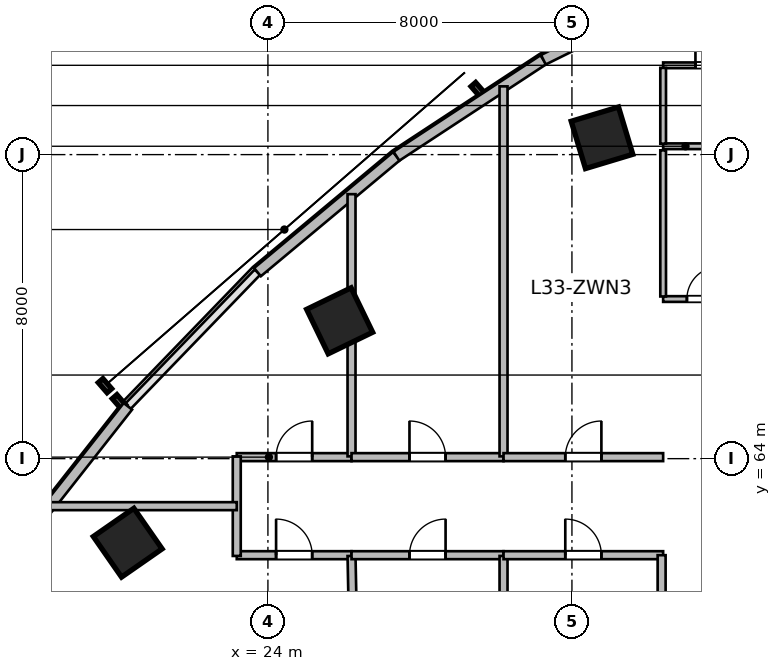
"""IFC4 building model, lengths in metres.
Left out: names, types, materials, properties, quantities, classifications, styles, units other than length and angle.
Written with IfcOpenShell. Run it as: python <this file> out.ifc"""

import sys

from ifc_helpers import new_model, si_unit, direction, frame, frame_2d, origin, origin_2d, place, context, subcontext, project, spatial, rectangle, extrude, source, transform, mapped, element, fill, save


model = new_model("IFC4")
c1 = context("Model", 3, precision=1e-05, world=origin(), true_north=direction((0.0, 1.0)))
c2 = subcontext(c1, "Body", "Model", "MODEL_VIEW")
j1 = project(units=[si_unit("LENGTHUNIT", "METRE"), si_unit("PLANEANGLEUNIT", "RADIAN")], contexts=[c1])
p1 = place(None, origin())
s1 = spatial("IfcSite", under=j1, at=p1, CompositionType="ELEMENT")
p2 = place(p1, origin())
s2 = spatial("IfcBuilding", under=s1, at=p2, CompositionType="ELEMENT")
p3 = place(p2, frame((0.0, 0.0, 138.9)))
s3 = spatial("IfcBuildingStorey", under=s2, at=p3, CompositionType="ELEMENT", Elevation=138.9)
m1 = source(origin(), c2, "Body", "SweptSolid", [
    extrude(rectangle(XDim=1.3, YDim=1.3, at=origin_2d()), origin(), (0.0, 0.0, 1.0), 3.9),
])
for number, where, z_axis, x_axis in (
    (1, (20.311, 61.789, 0.0), (0.0, 0.0, 1.0), (-0.571, 0.821, 0.0)),
    (2, (25.888, 67.627, 0.0), (0.0, 0.0, 1.0), (-0.436, 0.9, 0.0)),
    (3, (32.791, 72.442, 0.0), (0.0, 0.0, 1.0), (-0.289, 0.957, 0.0)),
):
    element("IfcColumn", number, at=place(p3, frame(where, z_axis=z_axis, x_axis=x_axis)), inside=s3, PredefinedType="COLUMN", context=c2, shape_type="MappedRepresentation", body=[
        mapped(m1, transform((0.0, 0.0, 0.0), scale=1.0)),
    ])
m2 = source(origin(), c2, "Body", "SweptSolid", [
    extrude(rectangle(XDim=5.058, YDim=0.28, at=frame_2d((2.529, 0.0))), origin(), (0.0, 0.0, 1.0), 3.65),
])
p4 = place(p3, frame((17.188, 61.4, 0.0), z_axis=(0.0, 0.0, 1.0), x_axis=(0.618145507434, 0.786063694391, 0.0)))
e4 = element("IfcWall", 4, at=p4, inside=s3, PredefinedType="SOLIDWALL", context=c2, shape_type="MappedRepresentation", body=[
    mapped(m2, transform((0.0, 0.0, 0.0), scale=1.0)),
])
m3 = source(origin(), c2, "Body", "SweptSolid", [
    extrude(rectangle(XDim=4.762, YDim=0.28, at=frame_2d((2.381, 0.0))), origin(), (0.0, 0.0, 1.0), 3.65),
])
p5 = place(p3, frame((23.725, 68.907, 0.0), z_axis=(0.0, 0.0, 1.0), x_axis=(0.767952279762, 0.640507061638, 0.0)))
e5 = element("IfcWall", 5, at=p5, inside=s3, PredefinedType="SOLIDWALL", context=c2, shape_type="MappedRepresentation", body=[
    mapped(m3, transform((0.0, 0.0, 0.0), scale=1.0)),
])
m4 = source(origin(), c2, "Body", "SweptSolid", [
    extrude(rectangle(XDim=4.626, YDim=0.28, at=frame_2d((2.313, 0.0))), origin(), (0.0, 0.0, 1.0), 3.65),
])
p6 = place(p3, frame((27.382, 71.958, 0.0), z_axis=(0.0, 0.0, 1.0), x_axis=(0.83595938331, 0.548791316855, 0.0)))
e6 = element("IfcWall", 6, at=p6, inside=s3, PredefinedType="SOLIDWALL", context=c2, shape_type="MappedRepresentation", body=[
    mapped(m4, transform((0.0, 0.0, 0.0), scale=1.0)),
])
m5 = source(origin(), c2, "Body", "SweptSolid", [
    extrude(rectangle(XDim=4.506, YDim=0.28, at=frame_2d((2.253, 0.0))), origin(), (0.0, 0.0, 1.0), 3.65),
])
p7 = place(p3, frame((31.249, 74.496, 0.0), z_axis=(0.0, 0.0, 1.0), x_axis=(0.89597155075, 0.444111450254, 0.0)))
e7 = element("IfcWall", 7, at=p7, inside=s3, PredefinedType="SOLIDWALL", context=c2, shape_type="MappedRepresentation", body=[
    mapped(m5, transform((0.0, 0.0, 0.0), scale=1.0)),
])
m6 = source(origin(), c2, "Body", "SweptSolid", [
    extrude(rectangle(XDim=2.1, YDim=0.15, at=frame_2d((1.05, 0.0))), origin(), (0.0, 0.0, 1.0), 3.65),
])
p8 = place(p3, frame((34.4, 72.22, 0.0), z_axis=(0.0, 0.0, 1.0), x_axis=(1.0, 0.0, 0.0)))
e8 = element("IfcWall", 8, at=p8, inside=s3, PredefinedType="PARTITIONING", context=c2, shape_type="MappedRepresentation", body=[
    mapped(m6, transform((0.0, 0.0, 0.0), scale=1.0)),
])
m7 = source(origin(), c2, "Body", "SweptSolid", [
    extrude(rectangle(XDim=2.8, YDim=0.15, at=frame_2d((1.4, 0.0))), origin(), (0.0, 0.0, 1.0), 3.65),
])
p9 = place(p3, frame((34.4, 74.35, 0.0), z_axis=(0.0, 0.0, 1.0), x_axis=(1.0, 0.0, 0.0)))
e9 = element("IfcWall", 9, at=p9, inside=s3, PredefinedType="PARTITIONING", context=c2, shape_type="MappedRepresentation", body=[
    mapped(m7, transform((0.0, 0.0, 0.0), scale=1.0)),
])
p10 = place(p9, frame((0.85, 0.0, 0.0)))
e10 = element("IfcOpeningElement", 10, at=p10, cuts=e9, PredefinedType="OPENING", context=c2, shape_type="SweptSolid", body=[
    extrude(rectangle(XDim=1.1, YDim=2.15, at=frame_2d((0.55, 1.075))), frame((0.0, 0.085, 0.0), z_axis=(0.0, -1.0, 0.0), x_axis=(1.0, 0.0, 0.0)), (0.0, 0.0, 1.0), 0.17),
])
m8 = source(origin(), c2, "Body", "SweptSolid", [
    extrude(rectangle(XDim=1.995, YDim=0.15, at=frame_2d((0.998, 0.0))), origin(), (0.0, 0.0, 1.0), 3.65),
])
p11 = place(p3, frame((34.4, 72.288, 0.0), z_axis=(0.0, 0.0, 1.0), x_axis=(0.0, 1.0, 0.0)))
e11 = element("IfcWall", 11, at=p11, inside=s3, PredefinedType="PARTITIONING", context=c2, shape_type="MappedRepresentation", body=[
    mapped(m8, transform((0.0, 0.0, 0.0), scale=1.0)),
])
p12 = place(p3, frame((34.4, 68.2, 0.0), z_axis=(0.0, 0.0, 1.0), x_axis=(1.0, 0.0, 0.0)))
e12 = element("IfcWall", 12, at=p12, inside=s3, PredefinedType="PARTITIONING", context=c2, shape_type="MappedRepresentation", body=[
    mapped(m6, transform((0.0, 0.0, 0.0), scale=1.0)),
])
p13 = place(p12, frame((0.625, 0.0, 0.0)))
e13 = element("IfcOpeningElement", 13, at=p13, cuts=e12, PredefinedType="OPENING", context=c2, shape_type="SweptSolid", body=[
    extrude(rectangle(XDim=0.85, YDim=2.1, at=frame_2d((0.425, 1.05))), frame((0.0, 0.085, 0.0), z_axis=(0.0, -1.0, 0.0), x_axis=(1.0, 0.0, 0.0)), (0.0, 0.0, 1.0), 0.17),
])
m9 = source(origin(), c2, "Body", "SweptSolid", [
    extrude(rectangle(XDim=3.845, YDim=0.15, at=frame_2d((1.922, 0.0))), origin(), (0.0, 0.0, 1.0), 3.65),
])
p14 = place(p3, frame((34.4, 68.268, 0.0), z_axis=(0.0, 0.0, 1.0), x_axis=(0.0, 1.0, 0.0)))
e14 = element("IfcWall", 14, at=p14, inside=s3, PredefinedType="PARTITIONING", context=c2, shape_type="MappedRepresentation", body=[
    mapped(m9, transform((0.0, 0.0, 0.0), scale=1.0)),
])
m10 = source(origin(), c2, "Body", "SweptSolid", [
    extrude(rectangle(XDim=3.02, YDim=0.21, at=frame_2d((1.51, 0.0))), origin(), (0.0, 0.0, 1.0), 3.65),
])
p15 = place(p3, frame((23.18, 64.04, 0.0), z_axis=(0.0, 0.0, 1.0), x_axis=(1.0, 0.0, 0.0)))
e15 = element("IfcWall", 15, at=p15, inside=s3, PredefinedType="PARTITIONING", context=c2, shape_type="MappedRepresentation", body=[
    mapped(m10, transform((0.0, 0.0, 0.0), scale=1.0)),
])
p16 = place(p15, frame((1.035, 0.0, 0.0)))
e16 = element("IfcOpeningElement", 16, at=p16, cuts=e15, PredefinedType="OPENING", context=c2, shape_type="SweptSolid", body=[
    extrude(rectangle(XDim=0.95, YDim=2.1, at=frame_2d((0.475, 1.05))), frame((0.0, 0.115, 0.0), z_axis=(0.0, -1.0, 0.0), x_axis=(1.0, 0.0, 0.0)), (0.0, 0.0, 1.0), 0.23),
])
m11 = source(origin(), c2, "Body", "SweptSolid", [
    extrude(rectangle(XDim=6.899, YDim=0.21, at=frame_2d((3.449, 0.0))), origin(), (0.0, 0.0, 1.0), 2.942),
])
p17 = place(p3, frame((26.2, 64.06, 0.0), z_axis=(0.0, 0.0, 1.0), x_axis=(0.0, 1.0, 0.0)))
e17 = element("IfcWall", 17, at=p17, inside=s3, PredefinedType="PARTITIONING", context=c2, shape_type="MappedRepresentation", body=[
    mapped(m11, transform((0.0, 0.0, 0.0), scale=1.0)),
])
m12 = source(origin(), c2, "Body", "SweptSolid", [
    extrude(rectangle(XDim=4.0, YDim=0.21, at=frame_2d((2.0, 0.0))), origin(), (0.0, 0.0, 1.0), 3.65),
])
p18 = place(p3, frame((26.2, 64.04, 0.0), z_axis=(0.0, 0.0, 1.0), x_axis=(1.0, 0.0, 0.0)))
e18 = element("IfcWall", 18, at=p18, inside=s3, PredefinedType="PARTITIONING", context=c2, shape_type="MappedRepresentation", body=[
    mapped(m12, transform((0.0, 0.0, 0.0), scale=1.0)),
])
p19 = place(p18, frame((1.525, 0.0, 0.0)))
e19 = element("IfcOpeningElement", 19, at=p19, cuts=e18, PredefinedType="OPENING", context=c2, shape_type="SweptSolid", body=[
    extrude(rectangle(XDim=0.95, YDim=2.1, at=frame_2d((0.475, 1.05))), frame((0.0, 0.115, 0.0), z_axis=(0.0, -1.0, 0.0), x_axis=(1.0, 0.0, 0.0)), (0.0, 0.0, 1.0), 0.23),
])
m13 = source(origin(), c2, "Body", "SweptSolid", [
    extrude(rectangle(XDim=9.736, YDim=0.21, at=frame_2d((4.868, 0.0))), origin(), (0.0, 0.0, 1.0), 3.65),
])
p20 = place(p3, frame((30.2, 64.06, 0.0), z_axis=(0.0, 0.0, 1.0), x_axis=(0.0, 1.0, 0.0)))
e20 = element("IfcWall", 20, at=p20, inside=s3, PredefinedType="PARTITIONING", context=c2, shape_type="MappedRepresentation", body=[
    mapped(m13, transform((0.0, 0.0, 0.0), scale=1.0)),
])
m14 = source(origin(), c2, "Body", "SweptSolid", [
    extrude(rectangle(XDim=4.2, YDim=0.21, at=frame_2d((2.1, 0.0))), origin(), (0.0, 0.0, 1.0), 3.65),
])
p21 = place(p3, frame((30.2, 64.04, 0.0), z_axis=(0.0, 0.0, 1.0), x_axis=(1.0, 0.0, 0.0)))
e21 = element("IfcWall", 21, at=p21, inside=s3, PredefinedType="PARTITIONING", context=c2, shape_type="MappedRepresentation", body=[
    mapped(m14, transform((0.0, 0.0, 0.0), scale=1.0)),
])
p22 = place(p21, frame((1.625, 0.0, 0.0)))
e22 = element("IfcOpeningElement", 22, at=p22, cuts=e21, PredefinedType="OPENING", context=c2, shape_type="SweptSolid", body=[
    extrude(rectangle(XDim=0.95, YDim=2.1, at=frame_2d((0.475, 1.05))), frame((0.0, 0.115, 0.0), z_axis=(0.0, -1.0, 0.0), x_axis=(1.0, 0.0, 0.0)), (0.0, 0.0, 1.0), 0.23),
])
p23 = place(p3, frame((23.18, 61.46, 0.0), z_axis=(0.0, 0.0, 1.0), x_axis=(1.0, 0.0, 0.0)))
e23 = element("IfcWall", 23, at=p23, inside=s3, PredefinedType="PARTITIONING", context=c2, shape_type="MappedRepresentation", body=[
    mapped(m10, transform((0.0, 0.0, 0.0), scale=1.0)),
])
p24 = place(p23, frame((1.035, 0.0, 0.0)))
e24 = element("IfcOpeningElement", 24, at=p24, cuts=e23, PredefinedType="OPENING", context=c2, shape_type="SweptSolid", body=[
    extrude(rectangle(XDim=0.95, YDim=2.1, at=frame_2d((0.475, 1.05))), frame((0.0, 0.115, 0.0), z_axis=(0.0, -1.0, 0.0), x_axis=(1.0, 0.0, 0.0)), (0.0, 0.0, 1.0), 0.23),
])
m15 = source(origin(), c2, "Body", "SweptSolid", [
    extrude(rectangle(XDim=24.204, YDim=0.21, at=frame_2d((12.102, 0.0))), origin(), (0.0, 0.0, 1.0), 2.942),
])
p25 = place(p3, frame((26.698, 37.241, 0.0), z_axis=(0.0, 0.0, 1.0), x_axis=(-0.020566881318, 0.999788479326, 0.0)))
e25 = element("IfcWall", 25, at=p25, inside=s3, PredefinedType="PARTITIONING", context=c2, shape_type="MappedRepresentation", body=[
    mapped(m15, transform((0.0, 0.0, 0.0), scale=1.0)),
])
p26 = place(p3, frame((26.2, 61.46, 0.0), z_axis=(0.0, 0.0, 1.0), x_axis=(1.0, 0.0, 0.0)))
e26 = element("IfcWall", 26, at=p26, inside=s3, PredefinedType="PARTITIONING", context=c2, shape_type="MappedRepresentation", body=[
    mapped(m12, transform((0.0, 0.0, 0.0), scale=1.0)),
])
p27 = place(p26, frame((1.525, 0.0, 0.0)))
e27 = element("IfcOpeningElement", 27, at=p27, cuts=e26, PredefinedType="OPENING", context=c2, shape_type="SweptSolid", body=[
    extrude(rectangle(XDim=0.95, YDim=2.1, at=frame_2d((0.475, 1.05))), frame((0.0, 0.115, 0.0), z_axis=(0.0, -1.0, 0.0), x_axis=(1.0, 0.0, 0.0)), (0.0, 0.0, 1.0), 0.23),
])
m16 = source(origin(), c2, "Body", "SweptSolid", [
    extrude(rectangle(XDim=19.103, YDim=0.21, at=frame_2d((9.552, 0.0))), origin(), (0.0, 0.0, 1.0), 2.942),
])
p28 = place(p3, frame((30.2, 42.337, 0.0), z_axis=(0.0, 0.0, 1.0), x_axis=(0.0, 1.0, 0.0)))
e28 = element("IfcWall", 28, at=p28, inside=s3, PredefinedType="PARTITIONING", context=c2, shape_type="MappedRepresentation", body=[
    mapped(m16, transform((0.0, 0.0, 0.0), scale=1.0)),
])
p29 = place(p3, frame((30.2, 61.46, 0.0), z_axis=(0.0, 0.0, 1.0), x_axis=(1.0, 0.0, 0.0)))
e29 = element("IfcWall", 29, at=p29, inside=s3, PredefinedType="PARTITIONING", context=c2, shape_type="MappedRepresentation", body=[
    mapped(m14, transform((0.0, 0.0, 0.0), scale=1.0)),
])
p30 = place(p29, frame((1.625, 0.0, 0.0)))
e30 = element("IfcOpeningElement", 30, at=p30, cuts=e29, PredefinedType="OPENING", context=c2, shape_type="SweptSolid", body=[
    extrude(rectangle(XDim=0.95, YDim=2.1, at=frame_2d((0.475, 1.05))), frame((0.0, 0.115, 0.0), z_axis=(0.0, -1.0, 0.0), x_axis=(1.0, 0.0, 0.0)), (0.0, 0.0, 1.0), 0.23),
])
m17 = source(origin(), c2, "Body", "SweptSolid", [
    extrude(rectangle(XDim=13.988, YDim=0.21, at=frame_2d((6.994, 0.0))), origin(), (0.0, 0.0, 1.0), 3.65),
])
p31 = place(p3, frame((34.36, 47.472, 0.0), z_axis=(0.0, 0.0, 1.0), x_axis=(0.0, 1.0, 0.0)))
e31 = element("IfcWall", 31, at=p31, inside=s3, PredefinedType="PARTITIONING", context=c2, shape_type="MappedRepresentation", body=[
    mapped(m17, transform((0.0, 0.0, 0.0), scale=1.0)),
])
m18 = source(origin(), c2, "Body", "SweptSolid", [
    extrude(rectangle(XDim=2.62, YDim=0.21, at=frame_2d((1.31, 0.0))), origin(), (0.0, 0.0, 1.0), 3.65),
])
p32 = place(p3, frame((23.18, 61.44, 0.0), z_axis=(0.0, 0.0, 1.0), x_axis=(0.0, 1.0, 0.0)))
e32 = element("IfcWall", 32, at=p32, inside=s3, PredefinedType="PARTITIONING", context=c2, shape_type="MappedRepresentation", body=[
    mapped(m18, transform((0.0, 0.0, 0.0), scale=1.0)),
])
m19 = source(origin(), c2, "Body", "SweptSolid", [
    extrude(rectangle(XDim=4.917, YDim=0.21, at=frame_2d((2.459, 0.0))), origin(), (0.0, 0.0, 1.0), 3.65),
])
p33 = place(p3, frame((18.262, 62.75, 0.0), z_axis=(0.0, 0.0, 1.0), x_axis=(1.0, 0.0, 0.0)))
e33 = element("IfcWall", 33, at=p33, inside=s3, PredefinedType="PARTITIONING", context=c2, shape_type="MappedRepresentation", body=[
    mapped(m19, transform((0.0, 0.0, 0.0), scale=1.0)),
])
m20 = source(origin(), c2, "Body", "SweptSolid", [
    extrude(rectangle(XDim=0.85, YDim=2.1, at=frame_2d((0.425, 1.05))), frame((0.0, 0.025, 0.0), z_axis=(0.0, -1.0, 0.0), x_axis=(1.0, 0.0, 0.0)), (0.0, 0.0, 1.0), 0.05),
])
p34 = place(p13, origin())
e34 = element("IfcDoor", 34, at=p34, inside=s3, OperationType="SINGLE_SWING_RIGHT", PredefinedType="DOOR", context=c2, shape_type="MappedRepresentation", body=[
    mapped(m20, transform((0.0, 0.0, 0.0), scale=1.0)),
])
fill(e13, e34)
m21 = source(origin(), c2, "Body", "SweptSolid", [
    extrude(rectangle(XDim=1.1, YDim=2.15, at=frame_2d((0.55, 1.075))), frame((0.0, 0.025, 0.0), z_axis=(0.0, -1.0, 0.0), x_axis=(1.0, 0.0, 0.0)), (0.0, 0.0, 1.0), 0.05),
])
p35 = place(p10, origin())
e35 = element("IfcDoor", 35, at=p35, inside=s3, OperationType="SINGLE_SWING_LEFT", PredefinedType="DOOR", context=c2, shape_type="MappedRepresentation", body=[
    mapped(m21, transform((0.0, 0.0, 0.0), scale=1.0)),
])
fill(e10, e35)
m22 = source(origin(), c2, "Body", "SweptSolid", [
    extrude(rectangle(XDim=0.95, YDim=2.1, at=frame_2d((0.475, 1.05))), frame((0.0, 0.025, 0.0), z_axis=(0.0, -1.0, 0.0), x_axis=(1.0, 0.0, 0.0)), (0.0, 0.0, 1.0), 0.05),
])
p36 = place(p16, origin())
e36 = element("IfcDoor", 36, at=p36, inside=s3, OperationType="SINGLE_SWING_RIGHT", PredefinedType="DOOR", context=c2, shape_type="MappedRepresentation", body=[
    mapped(m22, transform((0.0, 0.0, 0.0), scale=1.0)),
])
fill(e16, e36)
p37 = place(p19, origin())
e37 = element("IfcDoor", 37, at=p37, inside=s3, OperationType="SINGLE_SWING_LEFT", PredefinedType="DOOR", context=c2, shape_type="MappedRepresentation", body=[
    mapped(m22, transform((0.0, 0.0, 0.0), scale=1.0)),
])
fill(e19, e37)
p38 = place(p22, origin())
e38 = element("IfcDoor", 38, at=p38, inside=s3, OperationType="SINGLE_SWING_RIGHT", PredefinedType="DOOR", context=c2, shape_type="MappedRepresentation", body=[
    mapped(m22, transform((0.0, 0.0, 0.0), scale=1.0)),
])
fill(e22, e38)
p39 = place(p24, origin())
e39 = element("IfcDoor", 39, at=p39, inside=s3, OperationType="SINGLE_SWING_LEFT", PredefinedType="DOOR", context=c2, shape_type="MappedRepresentation", body=[
    mapped(m22, transform((0.0, 0.0, 0.0), scale=1.0)),
])
fill(e24, e39)
p40 = place(p27, origin())
e40 = element("IfcDoor", 40, at=p40, inside=s3, OperationType="SINGLE_SWING_RIGHT", PredefinedType="DOOR", context=c2, shape_type="MappedRepresentation", body=[
    mapped(m22, transform((0.0, 0.0, 0.0), scale=1.0)),
])
fill(e27, e40)
p41 = place(p30, origin())
e41 = element("IfcDoor", 41, at=p41, inside=s3, OperationType="SINGLE_SWING_LEFT", PredefinedType="DOOR", context=c2, shape_type="MappedRepresentation", body=[
    mapped(m22, transform((0.0, 0.0, 0.0), scale=1.0)),
])
fill(e30, e41)
save(model, sys.argv[1])
